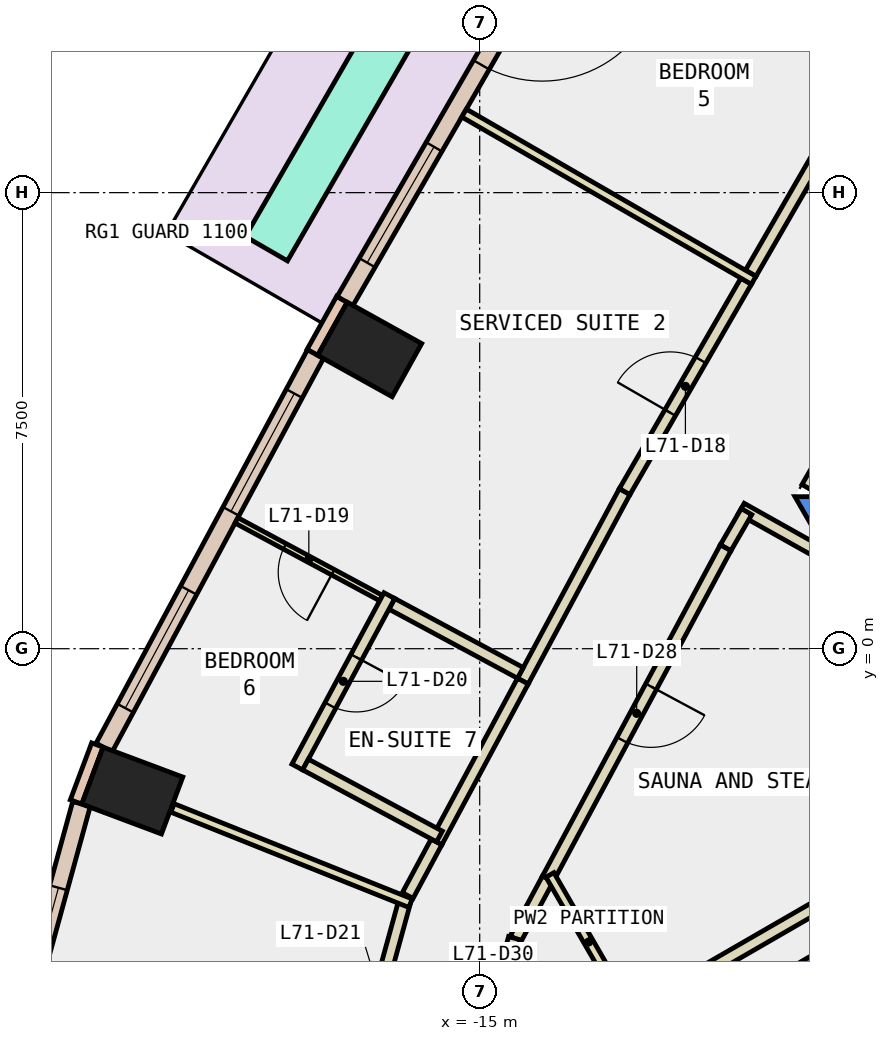
"""IFC4 building model, lengths in metres.
Left out: names, types, materials, properties, quantities, classifications, styles, units other than length and angle.
Written with IfcOpenShell. Run it as: python <this file> out.ifc"""

import sys

from ifc_helpers import new_model, si_unit, direction, frame, frame_2d, origin, origin_2d, place, context, subcontext, project, spatial, polyline, rectangle, outline, extrude, element, fill, save


model = new_model("IFC4")
c1 = context("Model", 3, precision=1e-05, world=origin(), true_north=direction((0.0, 1.0)))
c2 = subcontext(c1, "Body", "Model", "MODEL_VIEW")
j1 = project(units=[si_unit("LENGTHUNIT", "METRE"), si_unit("PLANEANGLEUNIT", "RADIAN")], contexts=[c1])
p1 = place(None, origin())
s1 = spatial("IfcSite", under=j1, at=p1, CompositionType="ELEMENT")
p2 = place(p1, origin())
s2 = spatial("IfcBuilding", under=s1, at=p2, CompositionType="ELEMENT")
p3 = place(p2, frame((0.0, 0.0, 304.4)))
s3 = spatial("IfcBuildingStorey", under=s2, at=p3, CompositionType="ELEMENT", Elevation=304.4)
for number, where, z_axis, x_axis in (
    (1, (-16.809, 4.921, -0.34), (0.0, 0.0, 1.0), (0.486, 0.874, 0.0)),
    (2, (-20.714, -2.333, -0.34), (0.0, 0.0, 1.0), (0.351, 0.936, 0.0)),
):
    element("IfcColumn", number, at=place(p3, frame(where, z_axis=z_axis, x_axis=x_axis)), inside=s3, PredefinedType="COLUMN", context=c2, shape_type="SweptSolid", body=[
        extrude(rectangle(XDim=1.0, YDim=1.4, at=origin_2d()), origin(), (0.0, 0.0, 1.0), 3.6),
    ])
p4 = place(p3, frame((0.0, 0.0, -0.34)))
e3 = element("IfcWall", 3, at=p4, inside=s3, PredefinedType="SHEAR", context=c2, shape_type="SweptSolid", body=[
    extrude(outline(polyline([(-9.815, 2.5), (-4.907, -6.0), (-4.619, -5.5), (-9.238, 2.5), (-9.815, 2.5)])), origin(), (0.0, 0.0, 1.0), 3.6),
])
p5 = place(p3, frame((-6.279, -3.625, -0.34), z_axis=(0.0, 0.0, 1.0), x_axis=(-0.866017533419, -0.500013631625, 0.0)))
e4 = element("IfcWall", 4, at=p5, inside=s3, PredefinedType="SHEAR", context=c2, shape_type="SweptSolid", body=[
    extrude(rectangle(XDim=9.0, YDim=0.8, at=frame_2d((4.5, 0.0))), origin(), (0.0, 0.0, 1.0), 3.6),
])
p6 = place(p3, frame((-17.266, 5.746, 0.0), z_axis=(0.0, 0.0, 1.0), x_axis=(-0.485850211157, -0.874042088414, 0.0)))
e5 = element("IfcWall", 5, at=p6, inside=s3, PredefinedType="STANDARD", context=c2, shape_type="SweptSolid", body=[
    extrude(rectangle(XDim=1.0, YDim=0.2, at=frame_2d((0.5, 0.0))), origin(), (0.0, 0.0, 1.0), 3.26),
])
p7 = place(p3, frame((-21.288, -1.584, 0.0), z_axis=(0.0, 0.0, 1.0), x_axis=(-0.350962844851, -0.936389385637, 0.0)))
e6 = element("IfcWall", 6, at=p7, inside=s3, PredefinedType="STANDARD", context=c2, shape_type="SweptSolid", body=[
    extrude(rectangle(XDim=1.0, YDim=0.2, at=frame_2d((0.5, 0.0))), origin(), (0.0, 0.0, 1.0), 3.26),
])
p8 = place(p3, frame((-13.559, 12.051, 0.0), z_axis=(0.0, 0.0, 1.0), x_axis=(-0.499905472729, -0.866079972252, 0.0)))
e7 = element("IfcWall", 7, at=p8, inside=s3, PredefinedType="STANDARD", context=c2, shape_type="SweptSolid", body=[
    extrude(rectangle(XDim=7.313, YDim=0.3, at=frame_2d((3.657, 0.0))), origin(), (0.0, 0.0, 1.0), 3.26),
])
p9 = place(p8, frame((0.828, 0.0, 0.0)))
e8 = element("IfcOpeningElement", 8, at=p9, cuts=e7, PredefinedType="OPENING", context=c2, shape_type="SweptSolid", body=[
    extrude(rectangle(XDim=2.0, YDim=2.4, at=frame_2d((1.0, 1.2))), frame((0.0, 0.16, 0.0), z_axis=(0.0, -1.0, 0.0), x_axis=(1.0, 0.0, 0.0)), (0.0, 0.0, 1.0), 0.32),
])
p10 = place(p8, frame((4.385, 0.0, 0.9)))
e9 = element("IfcOpeningElement", 9, at=p10, cuts=e7, PredefinedType="OPENING", context=c2, shape_type="SweptSolid", body=[
    extrude(rectangle(XDim=2.2, YDim=2.0, at=frame_2d((1.1, 1.0))), frame((0.0, 0.16, 0.0), z_axis=(0.0, -1.0, 0.0), x_axis=(1.0, 0.0, 0.0)), (0.0, 0.0, 1.0), 0.32),
])
p11 = place(p3, frame((-17.701, 4.845, 0.0), z_axis=(0.0, 0.0, 1.0), x_axis=(-0.473225522632, -0.880941317415, 0.0)))
e10 = element("IfcWall", 10, at=p11, inside=s3, PredefinedType="STANDARD", context=c2, shape_type="SweptSolid", body=[
    extrude(rectangle(XDim=7.345, YDim=0.3, at=frame_2d((3.673, 0.0))), origin(), (0.0, 0.0, 1.0), 3.26),
])
p12 = place(p11, frame((0.736, 0.0, 0.9)))
e11 = element("IfcOpeningElement", 11, at=p12, cuts=e10, PredefinedType="OPENING", context=c2, shape_type="SweptSolid", body=[
    extrude(rectangle(XDim=2.2, YDim=2.0, at=frame_2d((1.1, 1.0))), frame((0.0, 0.16, 0.0), z_axis=(0.0, -1.0, 0.0), x_axis=(1.0, 0.0, 0.0)), (0.0, 0.0, 1.0), 0.32),
])
p13 = place(p11, frame((4.409, 0.0, 0.9)))
e12 = element("IfcOpeningElement", 12, at=p13, cuts=e10, PredefinedType="OPENING", context=c2, shape_type="SweptSolid", body=[
    extrude(rectangle(XDim=2.2, YDim=2.0, at=frame_2d((1.1, 1.0))), frame((0.0, 0.16, 0.0), z_axis=(0.0, -1.0, 0.0), x_axis=(1.0, 0.0, 0.0)), (0.0, 0.0, 1.0), 0.32),
])
p14 = place(p3, frame((-21.549, -2.553, 0.0), z_axis=(0.0, 0.0, 1.0), x_axis=(-0.264892613927, -0.964277917971, 0.0)))
e13 = element("IfcWall", 13, at=p14, inside=s3, PredefinedType="STANDARD", context=c2, shape_type="SweptSolid", body=[
    extrude(rectangle(XDim=4.258, YDim=0.3, at=frame_2d((2.129, 0.0))), origin(), (0.0, 0.0, 1.0), 3.26),
])
p15 = place(p14, frame((1.429, 0.0, 0.9)))
e14 = element("IfcOpeningElement", 14, at=p15, cuts=e13, PredefinedType="OPENING", context=c2, shape_type="SweptSolid", body=[
    extrude(rectangle(XDim=1.4, YDim=2.0, at=frame_2d((0.7, 1.0))), frame((0.0, 0.16, 0.0), z_axis=(0.0, -1.0, 0.0), x_axis=(1.0, 0.0, 0.0)), (0.0, 0.0, 1.0), 0.32),
])
p16 = place(p3, frame((-14.95, 12.74, 0.0), z_axis=(0.0, 0.0, 1.0), x_axis=(-0.500043210338, -0.866000454847, 0.0)))
e15 = element("IfcWall", 15, at=p16, inside=s3, PredefinedType="STANDARD", context=c2, shape_type="SweptSolid", body=[
    extrude(rectangle(XDim=7.115, YDim=0.8, at=frame_2d((3.558, 0.0))), origin(), (0.0, 0.0, 1.0), 0.8),
])
p17 = place(p3, frame((-9.203, 1.465, 0.0), z_axis=(0.0, 0.0, 1.0), x_axis=(-0.872243753731, 0.489071399775, 0.0)))
e16 = element("IfcWall", 16, at=p17, inside=s3, PredefinedType="PARTITIONING", context=c2, shape_type="SweptSolid", body=[
    extrude(rectangle(XDim=1.715, YDim=0.2, at=frame_2d((0.858, 0.0))), origin(), (0.0, 0.0, 1.0), 3.26),
])
p18 = place(p3, frame((-10.612, 2.255, 0.0), z_axis=(0.0, 0.0, 1.0), x_axis=(-0.499916971989, -0.866073334723, 0.0)))
e17 = element("IfcWall", 17, at=p18, inside=s3, PredefinedType="PARTITIONING", context=c2, shape_type="SweptSolid", body=[
    extrude(rectangle(XDim=0.688, YDim=0.2, at=frame_2d((0.344, 0.0))), origin(), (0.0, 0.0, 1.0), 3.26),
])
p19 = place(p3, frame((-10.956, 1.659, 0.0), z_axis=(0.0, 0.0, 1.0), x_axis=(-0.473095976848, -0.881010894762, 0.0)))
e18 = element("IfcWall", 18, at=p19, inside=s3, PredefinedType="PARTITIONING", context=c2, shape_type="SweptSolid", body=[
    extrude(rectangle(XDim=6.18, YDim=0.2, at=frame_2d((3.09, 0.0))), origin(), (0.0, 0.0, 1.0), 3.26),
])
p20 = place(p19, frame((2.59, 0.0, 0.0)))
e19 = element("IfcOpeningElement", 19, at=p20, cuts=e18, PredefinedType="OPENING", context=c2, shape_type="SweptSolid", body=[
    extrude(rectangle(XDim=1.0, YDim=2.1, at=frame_2d((0.5, 1.05))), frame((0.0, 0.11, 0.0), z_axis=(0.0, -1.0, 0.0), x_axis=(1.0, 0.0, 0.0)), (0.0, 0.0, 1.0), 0.22),
])
p21 = place(p3, frame((-13.88, -3.786, 0.0), z_axis=(0.0, 0.0, 1.0), x_axis=(-0.473500327913, -0.880793641817, 0.0)))
e20 = element("IfcWall", 20, at=p21, inside=s3, PredefinedType="PARTITIONING", context=c2, shape_type="SweptSolid", body=[
    extrude(rectangle(XDim=1.117, YDim=0.2, at=frame_2d((0.559, 0.0))), origin(), (0.0, 0.0, 1.0), 3.26),
])
p22 = place(p3, frame((-14.429, -4.761, 0.0), z_axis=(0.0, 0.0, 1.0), x_axis=(-0.265321869293, -0.964159896321, 0.0)))
e21 = element("IfcWall", 21, at=p22, inside=s3, PredefinedType="PARTITIONING", context=c2, shape_type="SweptSolid", body=[
    extrude(rectangle(XDim=2.642, YDim=0.2, at=frame_2d((1.321, 0.0))), origin(), (0.0, 0.0, 1.0), 3.26),
])
p23 = place(p22, frame((0.821, 0.0, 0.0)))
e22 = element("IfcOpeningElement", 22, at=p23, cuts=e21, PredefinedType="OPENING", context=c2, shape_type="SweptSolid", body=[
    extrude(rectangle(XDim=1.0, YDim=2.1, at=frame_2d((0.5, 1.05))), frame((0.0, 0.11, 0.0), z_axis=(0.0, -1.0, 0.0), x_axis=(1.0, 0.0, 0.0)), (0.0, 0.0, 1.0), 0.22),
])
p24 = place(p3, frame((-10.543, 6.174, 0.0), z_axis=(0.0, 0.0, 1.0), x_axis=(0.50008212199, 0.86597798544, 0.0)))
e23 = element("IfcWall", 23, at=p24, inside=s3, PredefinedType="PARTITIONING", context=c2, shape_type="SweptSolid", body=[
    extrude(rectangle(XDim=3.995, YDim=0.2, at=frame_2d((1.998, 0.0))), origin(), (0.0, 0.0, 1.0), 3.26),
])
p25 = place(p3, frame((-14.29, -0.533, 0.0), z_axis=(0.0, 0.0, 1.0), x_axis=(0.473161350875, 0.880975786295, 0.0)))
e24 = element("IfcWall", 24, at=p25, inside=s3, PredefinedType="PARTITIONING", context=c2, shape_type="SweptSolid", body=[
    extrude(rectangle(XDim=3.538, YDim=0.2, at=frame_2d((1.769, 0.0))), origin(), (0.0, 0.0, 1.0), 3.26),
])
p26 = place(p3, frame((-12.616, 2.584, 0.0), z_axis=(0.0, 0.0, 1.0), x_axis=(0.50008212199, 0.86597798544, 0.0)))
e25 = element("IfcWall", 25, at=p26, inside=s3, PredefinedType="PARTITIONING", context=c2, shape_type="SweptSolid", body=[
    extrude(rectangle(XDim=3.995, YDim=0.2, at=frame_2d((1.998, 0.0))), origin(), (0.0, 0.0, 1.0), 3.26),
])
p27 = place(p26, frame((1.498, 0.0, 0.0)))
e26 = element("IfcOpeningElement", 26, at=p27, cuts=e25, PredefinedType="OPENING", context=c2, shape_type="SweptSolid", body=[
    extrude(rectangle(XDim=1.0, YDim=2.1, at=frame_2d((0.5, 1.05))), frame((0.0, 0.11, 0.0), z_axis=(0.0, -1.0, 0.0), x_axis=(1.0, 0.0, 0.0)), (0.0, 0.0, 1.0), 0.22),
])
p28 = place(p3, frame((-16.184, -4.059, 0.0), z_axis=(0.0, 0.0, 1.0), x_axis=(0.473039108954, 0.881041430013, 0.0)))
e27 = element("IfcWall", 27, at=p28, inside=s3, PredefinedType="PARTITIONING", context=c2, shape_type="SweptSolid", body=[
    extrude(rectangle(XDim=1.002, YDim=0.2, at=frame_2d((0.501, 0.0))), origin(), (0.0, 0.0, 1.0), 3.26),
])
p29 = place(p3, frame((-15.71, -3.176, 0.0), z_axis=(0.0, 0.0, 1.0), x_axis=(0.473255284848, 0.880925329051, 0.0)))
e28 = element("IfcWall", 28, at=p29, inside=s3, PredefinedType="PARTITIONING", context=c2, shape_type="SweptSolid", body=[
    extrude(rectangle(XDim=3.0, YDim=0.2, at=frame_2d((1.5, 0.0))), origin(), (0.0, 0.0, 1.0), 3.26),
])
p30 = place(p3, frame((-17.097, -7.297, 0.0), z_axis=(0.0, 0.0, 1.0), x_axis=(0.264861686213, 0.964286413456, 0.0)))
e29 = element("IfcWall", 29, at=p30, inside=s3, PredefinedType="PARTITIONING", context=c2, shape_type="SweptSolid", body=[
    extrude(rectangle(XDim=3.292, YDim=0.2, at=frame_2d((1.646, 0.0))), origin(), (0.0, 0.0, 1.0), 3.26),
])
p31 = place(p30, frame((1.195, 0.0, 0.0)))
e30 = element("IfcOpeningElement", 30, at=p31, cuts=e29, PredefinedType="OPENING", context=c2, shape_type="SweptSolid", body=[
    extrude(rectangle(XDim=1.0, YDim=2.1, at=frame_2d((0.5, 1.05))), frame((0.0, 0.11, 0.0), z_axis=(0.0, -1.0, 0.0), x_axis=(1.0, 0.0, 0.0)), (0.0, 0.0, 1.0), 0.22),
])
p32 = place(p3, frame((-6.804, -2.714, 0.0), z_axis=(0.0, 0.0, 1.0), x_axis=(-0.866057565063, -0.499944290893, 0.0)))
e31 = element("IfcWall", 31, at=p32, inside=s3, PredefinedType="PARTITIONING", context=c2, shape_type="SweptSolid", body=[
    extrude(rectangle(XDim=6.7, YDim=0.2, at=frame_2d((3.35, 0.0))), origin(), (0.0, 0.0, 1.0), 3.26),
])
p33 = place(p3, frame((-12.57, -5.927, 0.0), z_axis=(0.0, 0.0, 1.0), x_axis=(-0.500197803108, 0.865911171983, 0.0)))
e32 = element("IfcWall", 32, at=p33, inside=s3, PredefinedType="PARTITIONING", context=c2, shape_type="SweptSolid", body=[
    extrude(rectangle(XDim=2.549, YDim=0.15, at=frame_2d((1.274, 0.0))), origin(), (0.0, 0.0, 1.0), 3.26),
])
p34 = place(p3, frame((-10.494, 6.059, 0.0), z_axis=(0.0, 0.0, 1.0), x_axis=(-0.866027397988, 0.499996545922, 0.0)))
e33 = element("IfcWall", 33, at=p34, inside=s3, PredefinedType="PARTITIONING", context=c2, shape_type="SweptSolid", body=[
    extrude(rectangle(XDim=5.5, YDim=0.15, at=frame_2d((2.75, 0.0))), origin(), (0.0, 0.0, 1.0), 3.26),
])
p35 = place(p3, frame((-16.621, 0.832, 0.0), z_axis=(0.0, 0.0, 1.0), x_axis=(-0.880914863524, 0.47327476504, 0.0)))
e34 = element("IfcWall", 34, at=p35, inside=s3, PredefinedType="PARTITIONING", context=c2, shape_type="SweptSolid", body=[
    extrude(rectangle(XDim=2.7, YDim=0.1, at=frame_2d((1.35, 0.0))), origin(), (0.0, 0.0, 1.0), 3.26),
])
p36 = place(p35, frame((0.9, 0.0, 0.0)))
e35 = element("IfcOpeningElement", 35, at=p36, cuts=e34, PredefinedType="OPENING", context=c2, shape_type="SweptSolid", body=[
    extrude(rectangle(XDim=0.9, YDim=2.1, at=frame_2d((0.45, 1.05))), frame((0.0, 0.06, 0.0), z_axis=(0.0, -1.0, 0.0), x_axis=(1.0, 0.0, 0.0)), (0.0, 0.0, 1.0), 0.12),
])
p37 = place(p3, frame((-14.331, -0.398, 0.0), z_axis=(0.0, 0.0, 1.0), x_axis=(-0.880875830026, 0.473347411608, 0.0)))
e36 = element("IfcWall", 36, at=p37, inside=s3, PredefinedType="PARTITIONING", context=c2, shape_type="SweptSolid", body=[
    extrude(rectangle(XDim=2.4, YDim=0.2, at=frame_2d((1.2, 0.0))), origin(), (0.0, 0.0, 1.0), 3.26),
])
p38 = place(p3, frame((-16.486, 0.873, 0.0), z_axis=(0.0, 0.0, 1.0), x_axis=(-0.473116768279, -0.88099972961, 0.0)))
e37 = element("IfcWall", 37, at=p38, inside=s3, PredefinedType="PARTITIONING", context=c2, shape_type="SweptSolid", body=[
    extrude(rectangle(XDim=3.2, YDim=0.2, at=frame_2d((1.6, 0.0))), origin(), (0.0, 0.0, 1.0), 3.26),
])
p39 = place(p38, frame((1.15, 0.0, 0.0)))
e38 = element("IfcOpeningElement", 38, at=p39, cuts=e37, PredefinedType="OPENING", context=c2, shape_type="SweptSolid", body=[
    extrude(rectangle(XDim=0.9, YDim=2.1, at=frame_2d((0.45, 1.05))), frame((0.0, 0.11, 0.0), z_axis=(0.0, -1.0, 0.0), x_axis=(1.0, 0.0, 0.0)), (0.0, 0.0, 1.0), 0.22),
])
p40 = place(p3, frame((-17.865, -1.905, 0.0), z_axis=(0.0, 0.0, 1.0), x_axis=(0.881022314299, -0.473074710493, 0.0)))
e39 = element("IfcWall", 39, at=p40, inside=s3, PredefinedType="PARTITIONING", context=c2, shape_type="SweptSolid", body=[
    extrude(rectangle(XDim=2.5, YDim=0.2, at=frame_2d((1.25, 0.0))), origin(), (0.0, 0.0, 1.0), 3.26),
])
p41 = place(p3, frame((-16.138, -4.185, 0.0), z_axis=(0.0, 0.0, 1.0), x_axis=(-0.928432751736, 0.371500505388, 0.0)))
e40 = element("IfcWall", 40, at=p41, inside=s3, PredefinedType="PARTITIONING", context=c2, shape_type="SweptSolid", body=[
    extrude(rectangle(XDim=4.216, YDim=0.15, at=frame_2d((2.108, 0.0))), origin(), (0.0, 0.0, 1.0), 3.26),
])
p42 = place(p3, frame((-9.15, 3.452, 0.0), z_axis=(0.0, 0.0, 1.0), x_axis=(-0.500079945886, -0.865979242085, 0.0)))
e41 = element("IfcWall", 41, at=p42, inside=s3, PredefinedType="PARTITIONING", context=c2, shape_type="SweptSolid", body=[
    extrude(rectangle(XDim=0.926, YDim=0.2, at=frame_2d((0.463, 0.0))), origin(), (0.0, 0.0, 1.0), 2.4),
])
p43 = place(p42, frame((0.017, 0.0, 0.0)))
e42 = element("IfcOpeningElement", 42, at=p43, cuts=e41, PredefinedType="OPENING", context=c2, shape_type="SweptSolid", body=[
    extrude(rectangle(XDim=0.9, YDim=2.1, at=frame_2d((0.45, 1.05))), frame((0.0, 0.11, 0.0), z_axis=(0.0, -1.0, 0.0), x_axis=(1.0, 0.0, 0.0)), (0.0, 0.0, 1.0), 0.22),
])
p44 = place(p9, origin())
e43 = element("IfcDoor", 43, at=p44, inside=s3, OperationType="SLIDING_TO_LEFT", PredefinedType="DOOR", context=c2, shape_type="SweptSolid", body=[
    extrude(rectangle(XDim=2.0, YDim=2.4, at=frame_2d((1.0, 1.2))), frame((0.0, 0.025, 0.0), z_axis=(0.0, -1.0, 0.0), x_axis=(1.0, 0.0, 0.0)), (0.0, 0.0, 1.0), 0.05),
])
fill(e8, e43)
p45 = place(p10, origin())
e44 = element("IfcWindow", 44, at=p45, inside=s3, PartitioningType="SINGLE_PANEL", PredefinedType="WINDOW", context=c2, shape_type="SweptSolid", body=[
    extrude(rectangle(XDim=2.2, YDim=2.0, at=frame_2d((1.1, 1.0))), frame((0.0, 0.03, 0.0), z_axis=(0.0, -1.0, 0.0), x_axis=(1.0, 0.0, 0.0)), (0.0, 0.0, 1.0), 0.06),
])
fill(e9, e44)
p46 = place(p12, origin())
e45 = element("IfcWindow", 45, at=p46, inside=s3, PartitioningType="SINGLE_PANEL", PredefinedType="WINDOW", context=c2, shape_type="SweptSolid", body=[
    extrude(rectangle(XDim=2.2, YDim=2.0, at=frame_2d((1.1, 1.0))), frame((0.0, 0.03, 0.0), z_axis=(0.0, -1.0, 0.0), x_axis=(1.0, 0.0, 0.0)), (0.0, 0.0, 1.0), 0.06),
])
fill(e11, e45)
p47 = place(p13, origin())
e46 = element("IfcWindow", 46, at=p47, inside=s3, PartitioningType="SINGLE_PANEL", PredefinedType="WINDOW", context=c2, shape_type="SweptSolid", body=[
    extrude(rectangle(XDim=2.2, YDim=2.0, at=frame_2d((1.1, 1.0))), frame((0.0, 0.03, 0.0), z_axis=(0.0, -1.0, 0.0), x_axis=(1.0, 0.0, 0.0)), (0.0, 0.0, 1.0), 0.06),
])
fill(e12, e46)
p48 = place(p15, origin())
e47 = element("IfcWindow", 47, at=p48, inside=s3, PartitioningType="SINGLE_PANEL", PredefinedType="WINDOW", context=c2, shape_type="SweptSolid", body=[
    extrude(rectangle(XDim=1.4, YDim=2.0, at=frame_2d((0.7, 1.0))), frame((0.0, 0.03, 0.0), z_axis=(0.0, -1.0, 0.0), x_axis=(1.0, 0.0, 0.0)), (0.0, 0.0, 1.0), 0.06),
])
fill(e14, e47)
p49 = place(p27, origin())
e48 = element("IfcDoor", 48, at=p49, inside=s3, OperationType="SINGLE_SWING_LEFT", PredefinedType="DOOR", context=c2, shape_type="SweptSolid", body=[
    extrude(rectangle(XDim=1.0, YDim=2.1, at=frame_2d((0.5, 1.05))), frame((0.0, 0.025, 0.0), z_axis=(0.0, -1.0, 0.0), x_axis=(1.0, 0.0, 0.0)), (0.0, 0.0, 1.0), 0.05),
])
fill(e26, e48)
p50 = place(p36, origin())
e49 = element("IfcDoor", 49, at=p50, inside=s3, OperationType="SINGLE_SWING_LEFT", PredefinedType="DOOR", context=c2, shape_type="SweptSolid", body=[
    extrude(rectangle(XDim=0.9, YDim=2.1, at=frame_2d((0.45, 1.05))), frame((0.0, 0.025, 0.0), z_axis=(0.0, -1.0, 0.0), x_axis=(1.0, 0.0, 0.0)), (0.0, 0.0, 1.0), 0.05),
])
fill(e35, e49)
p51 = place(p39, origin())
e50 = element("IfcDoor", 50, at=p51, inside=s3, OperationType="SINGLE_SWING_LEFT", PredefinedType="DOOR", context=c2, shape_type="SweptSolid", body=[
    extrude(rectangle(XDim=0.9, YDim=2.1, at=frame_2d((0.45, 1.05))), frame((0.0, 0.025, 0.0), z_axis=(0.0, -1.0, 0.0), x_axis=(1.0, 0.0, 0.0)), (0.0, 0.0, 1.0), 0.05),
])
fill(e38, e50)
p52 = place(p20, origin())
e51 = element("IfcDoor", 51, at=p52, inside=s3, OperationType="SINGLE_SWING_LEFT", PredefinedType="DOOR", context=c2, shape_type="SweptSolid", body=[
    extrude(rectangle(XDim=1.0, YDim=2.1, at=frame_2d((0.5, 1.05))), frame((0.0, 0.025, 0.0), z_axis=(0.0, -1.0, 0.0), x_axis=(1.0, 0.0, 0.0)), (0.0, 0.0, 1.0), 0.05),
])
fill(e19, e51)
p53 = place(p43, origin())
e52 = element("IfcDoor", 52, at=p53, inside=s3, OperationType="SINGLE_SWING_LEFT", PredefinedType="DOOR", context=c2, shape_type="SweptSolid", body=[
    extrude(rectangle(XDim=0.9, YDim=2.1, at=frame_2d((0.45, 1.05))), frame((0.0, 0.025, 0.0), z_axis=(0.0, -1.0, 0.0), x_axis=(1.0, 0.0, 0.0)), (0.0, 0.0, 1.0), 0.05),
])
fill(e42, e52)
save(model, sys.argv[1])
